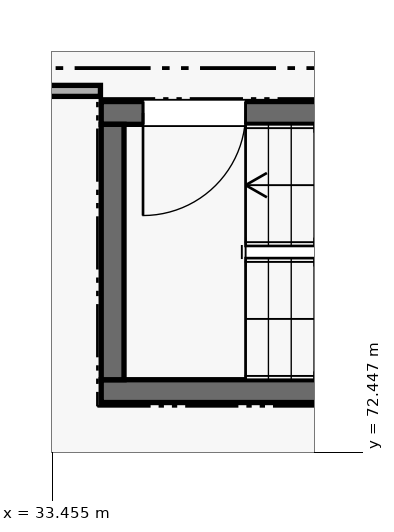
"""IFC4 building model, lengths in metres.
Left out: names, types, materials, properties, quantities, classifications, styles, units other than length and angle.
Written with IfcOpenShell. Run it as: python <this file> out.ifc"""

import sys

from ifc_helpers import new_model, si_unit, direction, frame, frame_2d, origin, place, context, subcontext, project, spatial, rectangle, extrude, element, fill, save


model = new_model("IFC4")
c1 = context("Model", 3, precision=1e-05, world=origin(), true_north=direction((0.0, 1.0)))
c2 = subcontext(c1, "Body", "Model", "MODEL_VIEW")
j1 = project(units=[si_unit("LENGTHUNIT", "METRE"), si_unit("PLANEANGLEUNIT", "RADIAN")], contexts=[c1])
p1 = place(None, origin())
s1 = spatial("IfcSite", under=j1, at=p1, CompositionType="ELEMENT")
p2 = place(p1, origin())
s2 = spatial("IfcBuilding", under=s1, at=p2, CompositionType="ELEMENT")
p3 = place(p2, frame((0.0, 0.0, 5.4)))
s3 = spatial("IfcBuildingStorey", under=s2, at=p3, CompositionType="ELEMENT", Elevation=5.4)
p4 = place(p3, frame((34.1, 73.25, 0.0), z_axis=(0.0, 0.0, 1.0), x_axis=(1.0, 0.0, 0.0)))
e1 = element("IfcWall", 1, at=p4, inside=s3, PredefinedType="SHEAR", context=c2, shape_type="SweptSolid", body=[
    extrude(rectangle(XDim=8.65, YDim=0.3, at=frame_2d((4.325, 0.0))), origin(), (0.0, 0.0, 1.0), 4.28),
])
p5 = place(p3, frame((42.75, 76.91, 0.0), z_axis=(0.0, 0.0, 1.0), x_axis=(-1.0, 0.0, 0.0)))
e2 = element("IfcWall", 2, at=p5, inside=s3, PredefinedType="SHEAR", context=c2, shape_type="SweptSolid", body=[
    extrude(rectangle(XDim=8.65, YDim=0.3, at=frame_2d((4.325, 0.0))), origin(), (0.0, 0.0, 1.0), 4.28),
])
p6 = place(p5, frame((6.75, 0.0, 0.0)))
e3 = element("IfcOpeningElement", 3, at=p6, cuts=e2, PredefinedType="OPENING", context=c2, shape_type="SweptSolid", body=[
    extrude(rectangle(XDim=1.35, YDim=2.2, at=frame_2d((0.675, 1.1))), frame((0.0, 0.16, 0.0), z_axis=(0.0, -1.0, 0.0), x_axis=(1.0, 0.0, 0.0)), (0.0, 0.0, 1.0), 0.32),
])
p7 = place(p3, frame((34.25, 76.76, 0.0), z_axis=(0.0, 0.0, 1.0), x_axis=(0.0, -1.0, 0.0)))
e4 = element("IfcWall", 4, at=p7, inside=s3, PredefinedType="SHEAR", context=c2, shape_type="SweptSolid", body=[
    extrude(rectangle(XDim=3.36, YDim=0.3, at=frame_2d((1.68, 0.0))), origin(), (0.0, 0.0, 1.0), 4.28),
])
p8 = place(p3, frame((22.16, 77.2, 0.0), z_axis=(0.0, 0.0, 1.0), x_axis=(1.0, 0.0, 0.0)))
e5 = element("IfcWall", 5, at=p8, inside=s3, PredefinedType="PARTITIONING", context=c2, shape_type="SweptSolid", body=[
    extrude(rectangle(XDim=11.93, YDim=0.145, at=frame_2d((5.965, 0.0))), origin(), (0.0, 0.0, 1.0), 3.725),
])
p9 = place(p8, frame((4.5, 0.0, 0.0)))
e6 = element("IfcOpeningElement", 6, at=p9, cuts=e5, PredefinedType="OPENING", context=c2, shape_type="SweptSolid", body=[
    extrude(rectangle(XDim=1.0, YDim=2.15, at=frame_2d((0.5, 1.075))), frame((0.0, 0.083, 0.0), z_axis=(0.0, -1.0, 0.0), x_axis=(1.0, 0.0, 0.0)), (0.0, 0.0, 1.0), 0.165),
])
p10 = place(p6, origin())
e7 = element("IfcDoor", 7, at=p10, inside=s3, OperationType="SINGLE_SWING_RIGHT", PredefinedType="DOOR", context=c2, shape_type="SweptSolid", body=[
    extrude(rectangle(XDim=1.35, YDim=2.2, at=frame_2d((0.675, 1.1))), frame((0.0, 0.025, 0.0), z_axis=(0.0, -1.0, 0.0), x_axis=(1.0, 0.0, 0.0)), (0.0, 0.0, 1.0), 0.05),
])
fill(e3, e7)
save(model, sys.argv[1])
